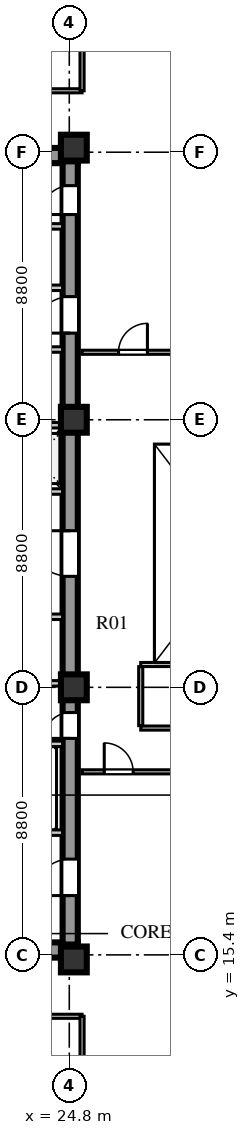
"""IFC4 building model, lengths in metres.
Left out: names, types, materials, properties, quantities, classifications, styles, units other than length and angle.
Written with IfcOpenShell. Run it as: python <this file> out.ifc"""

import sys

from ifc_helpers import new_model, si_unit, direction, frame, frame_2d, origin, origin_2d, place, context, subcontext, project, spatial, rectangle, extrude, element, fill, save


model = new_model("IFC4")
c1 = context("Model", 3, precision=1e-05, world=origin(), true_north=direction((0.0, 1.0)))
c2 = subcontext(c1, "Body", "Model", "MODEL_VIEW")
j1 = project(units=[si_unit("LENGTHUNIT", "METRE"), si_unit("PLANEANGLEUNIT", "RADIAN")], contexts=[c1])
p1 = place(None, origin())
s1 = spatial("IfcSite", under=j1, at=p1, CompositionType="ELEMENT")
p2 = place(p1, origin())
s2 = spatial("IfcBuilding", under=s1, at=p2, CompositionType="ELEMENT")
p3 = place(p2, frame((0.0, 0.0, 119.4)))
s3 = spatial("IfcBuildingStorey", under=s2, at=p3, CompositionType="ELEMENT", Elevation=119.4)
for number, where, z_axis, x_axis in (
    (1, (15.4, 15.56, 0.0), (0.0, 0.0, 1.0), (1.0, 0.0, 0.0)),
    (2, (15.4, 41.69, 0.0), (0.0, 0.0, 1.0), (1.0, 0.0, 0.0)),
):
    element("IfcWall", number, at=place(p3, frame(where, z_axis=z_axis, x_axis=x_axis)), inside=s3, PredefinedType="SHEAR", context=c2, shape_type="SweptSolid", body=[
        extrude(rectangle(XDim=9.68, YDim=0.5, at=frame_2d((4.84, 0.0))), origin(), (0.0, 0.0, 1.0), 3.6),
    ])
p4 = place(p3, frame((24.83, 15.74, 0.0), z_axis=(0.0, 0.0, 1.0), x_axis=(0.0, 1.0, 0.0)))
e3 = element("IfcWall", 3, at=p4, inside=s3, PredefinedType="SHEAR", context=c2, shape_type="SweptSolid", body=[
    extrude(rectangle(XDim=25.76, YDim=0.5, at=frame_2d((12.88, 0.0))), origin(), (0.0, 0.0, 1.0), 3.6),
])
p5 = place(p4, frame((1.61, 0.0, 0.0)))
e4 = element("IfcOpeningElement", 4, at=p5, cuts=e3, PredefinedType="OPENING", context=c2, shape_type="SweptSolid", body=[
    extrude(rectangle(XDim=1.2, YDim=2.1, at=frame_2d((0.6, 1.05))), frame((0.0, 0.26, 0.0), z_axis=(0.0, -1.0, 0.0), x_axis=(1.0, 0.0, 0.0)), (0.0, 0.0, 1.0), 0.52),
])
p6 = place(p4, frame((6.78, 0.0, 0.0)))
e5 = element("IfcOpeningElement", 5, at=p6, cuts=e3, PredefinedType="OPENING", context=c2, shape_type="SweptSolid", body=[
    extrude(rectangle(XDim=0.85, YDim=2.06, at=frame_2d((0.425, 1.03))), frame((0.0, 0.26, 0.0), z_axis=(0.0, -1.0, 0.0), x_axis=(1.0, 0.0, 0.0)), (0.0, 0.0, 1.0), 0.52),
])
p7 = place(p4, frame((12.11, 0.0, 0.0)))
e6 = element("IfcOpeningElement", 6, at=p7, cuts=e3, PredefinedType="OPENING", context=c2, shape_type="SweptSolid", body=[
    extrude(rectangle(XDim=1.5, YDim=2.12, at=frame_2d((0.75, 1.06))), frame((0.0, 0.26, 0.0), z_axis=(0.0, -1.0, 0.0), x_axis=(1.0, 0.0, 0.0)), (0.0, 0.0, 1.0), 0.52),
])
p8 = place(p4, frame((20.11, 0.0, 0.0)))
e7 = element("IfcOpeningElement", 7, at=p8, cuts=e3, PredefinedType="OPENING", context=c2, shape_type="SweptSolid", body=[
    extrude(rectangle(XDim=1.2, YDim=2.12, at=frame_2d((0.6, 1.06))), frame((0.0, 0.26, 0.0), z_axis=(0.0, -1.0, 0.0), x_axis=(1.0, 0.0, 0.0)), (0.0, 0.0, 1.0), 0.52),
])
p9 = place(p4, frame((24.01, 0.0, 0.0)))
e8 = element("IfcOpeningElement", 8, at=p9, cuts=e3, PredefinedType="OPENING", context=c2, shape_type="SweptSolid", body=[
    extrude(rectangle(XDim=0.95, YDim=2.1, at=frame_2d((0.475, 1.05))), frame((0.0, 0.26, 0.0), z_axis=(0.0, -1.0, 0.0), x_axis=(1.0, 0.0, 0.0)), (0.0, 0.0, 1.0), 0.52),
])
for number, where, z_axis, x_axis in (
    (9, (24.95, 15.25, 0.0), (0.0, 0.0, 1.0), (1.0, 0.0, 0.0)),
    (10, (24.95, 24.2, 0.0), (0.0, 0.0, 1.0), (1.0, 0.0, 0.0)),
    (11, (24.95, 33.0, 0.0), (0.0, 0.0, 1.0), (1.0, 0.0, 0.0)),
    (12, (24.95, 41.95, 0.0), (0.0, 0.0, 1.0), (1.0, 0.0, 0.0)),
):
    element("IfcColumn", number, at=place(p3, frame(where, z_axis=z_axis, x_axis=x_axis)), inside=s3, PredefinedType="COLUMN", context=c2, shape_type="SweptSolid", body=[
        extrude(rectangle(XDim=0.85, YDim=0.85, at=origin_2d()), origin(), (0.0, 0.0, 1.0), 3.6),
    ])
p10 = place(p3, frame((19.64, 19.42, 0.0), z_axis=(0.0, 0.0, 1.0), x_axis=(1.0, 0.0, 0.0)))
e13 = element("IfcWall", 13, at=p10, inside=s3, PredefinedType="SOLIDWALL", context=c2, shape_type="SweptSolid", body=[
    extrude(rectangle(XDim=4.94, YDim=0.18, at=frame_2d((2.47, 0.0))), origin(), (0.0, 0.0, 1.0), 3.6),
])
p11 = place(p10, frame((0.72, 0.0, 0.0)))
e14 = element("IfcOpeningElement", 14, at=p11, cuts=e13, PredefinedType="OPENING", context=c2, shape_type="SweptSolid", body=[
    extrude(rectangle(XDim=1.1, YDim=2.1, at=frame_2d((0.55, 1.05))), frame((0.0, 0.1, 0.0), z_axis=(0.0, -1.0, 0.0), x_axis=(1.0, 0.0, 0.0)), (0.0, 0.0, 1.0), 0.2),
])
p12 = place(p10, frame((3.02, 0.0, 0.0)))
e15 = element("IfcOpeningElement", 15, at=p12, cuts=e13, PredefinedType="OPENING", context=c2, shape_type="SweptSolid", body=[
    extrude(rectangle(XDim=1.1, YDim=2.1, at=frame_2d((0.55, 1.05))), frame((0.0, 0.1, 0.0), z_axis=(0.0, -1.0, 0.0), x_axis=(1.0, 0.0, 0.0)), (0.0, 0.0, 1.0), 0.2),
])
p13 = place(p3, frame((19.64, 22.34, 0.0), z_axis=(0.0, 0.0, 1.0), x_axis=(1.0, 0.0, 0.0)))
e16 = element("IfcWall", 16, at=p13, inside=s3, PredefinedType="SOLIDWALL", context=c2, shape_type="SweptSolid", body=[
    extrude(rectangle(XDim=4.94, YDim=0.18, at=frame_2d((2.47, 0.0))), origin(), (0.0, 0.0, 1.0), 3.6),
])
p14 = place(p3, frame((15.9, 26.52, 0.0), z_axis=(0.0, 0.0, 1.0), x_axis=(1.0, 0.0, 0.0)))
e17 = element("IfcWall", 17, at=p14, inside=s3, PredefinedType="SOLIDWALL", context=c2, shape_type="SweptSolid", body=[
    extrude(rectangle(XDim=8.68, YDim=0.18, at=frame_2d((4.34, 0.0))), origin(), (0.0, 0.0, 1.0), 3.6),
])
p15 = place(p14, frame((2.5, 0.0, 0.0)))
e18 = element("IfcOpeningElement", 18, at=p15, cuts=e17, PredefinedType="OPENING", context=c2, shape_type="SweptSolid", body=[
    extrude(rectangle(XDim=0.95, YDim=2.1, at=frame_2d((0.475, 1.05))), frame((0.0, 0.1, 0.0), z_axis=(0.0, -1.0, 0.0), x_axis=(1.0, 0.0, 0.0)), (0.0, 0.0, 1.0), 0.2),
])
p16 = place(p14, frame((6.0, 0.0, 0.0)))
e19 = element("IfcOpeningElement", 19, at=p16, cuts=e17, PredefinedType="OPENING", context=c2, shape_type="SweptSolid", body=[
    extrude(rectangle(XDim=0.95, YDim=2.1, at=frame_2d((0.475, 1.05))), frame((0.0, 0.1, 0.0), z_axis=(0.0, -1.0, 0.0), x_axis=(1.0, 0.0, 0.0)), (0.0, 0.0, 1.0), 0.2),
])
p17 = place(p3, frame((15.9, 24.33, 0.0), z_axis=(0.0, 0.0, 1.0), x_axis=(1.0, 0.0, 0.0)))
e20 = element("IfcWall", 20, at=p17, inside=s3, PredefinedType="SOLIDWALL", context=c2, shape_type="SweptSolid", body=[
    extrude(rectangle(XDim=8.68, YDim=0.18, at=frame_2d((4.34, 0.0))), origin(), (0.0, 0.0, 1.0), 2.95),
])
p18 = place(p3, frame((15.9, 30.64, 0.0), z_axis=(0.0, 0.0, 1.0), x_axis=(1.0, 0.0, 0.0)))
e21 = element("IfcWall", 21, at=p18, inside=s3, PredefinedType="SOLIDWALL", context=c2, shape_type="SweptSolid", body=[
    extrude(rectangle(XDim=8.68, YDim=0.18, at=frame_2d((4.34, 0.0))), origin(), (0.0, 0.0, 1.0), 3.6),
])
p19 = place(p18, frame((1.76, 0.0, 0.0)))
e22 = element("IfcOpeningElement", 22, at=p19, cuts=e21, PredefinedType="OPENING", context=c2, shape_type="SweptSolid", body=[
    extrude(rectangle(XDim=1.0, YDim=2.1, at=frame_2d((0.5, 1.05))), frame((0.0, 0.1, 0.0), z_axis=(0.0, -1.0, 0.0), x_axis=(1.0, 0.0, 0.0)), (0.0, 0.0, 1.0), 0.2),
])
p20 = place(p18, frame((3.6, 0.0, 0.0)))
e23 = element("IfcOpeningElement", 23, at=p20, cuts=e21, PredefinedType="OPENING", context=c2, shape_type="SweptSolid", body=[
    extrude(rectangle(XDim=1.0, YDim=2.1, at=frame_2d((0.5, 1.05))), frame((0.0, 0.1, 0.0), z_axis=(0.0, -1.0, 0.0), x_axis=(1.0, 0.0, 0.0)), (0.0, 0.0, 1.0), 0.2),
])
p21 = place(p18, frame((5.44, 0.0, 0.0)))
e24 = element("IfcOpeningElement", 24, at=p21, cuts=e21, PredefinedType="OPENING", context=c2, shape_type="SweptSolid", body=[
    extrude(rectangle(XDim=1.0, YDim=2.1, at=frame_2d((0.5, 1.05))), frame((0.0, 0.1, 0.0), z_axis=(0.0, -1.0, 0.0), x_axis=(1.0, 0.0, 0.0)), (0.0, 0.0, 1.0), 0.2),
])
p22 = place(p18, frame((7.28, 0.0, 0.0)))
e25 = element("IfcOpeningElement", 25, at=p22, cuts=e21, PredefinedType="OPENING", context=c2, shape_type="SweptSolid", body=[
    extrude(rectangle(XDim=1.0, YDim=2.1, at=frame_2d((0.5, 1.05))), frame((0.0, 0.1, 0.0), z_axis=(0.0, -1.0, 0.0), x_axis=(1.0, 0.0, 0.0)), (0.0, 0.0, 1.0), 0.2),
])
p23 = place(p3, frame((15.9, 32.82, 0.0), z_axis=(0.0, 0.0, 1.0), x_axis=(1.0, 0.0, 0.0)))
e26 = element("IfcWall", 26, at=p23, inside=s3, PredefinedType="SOLIDWALL", context=c2, shape_type="SweptSolid", body=[
    extrude(rectangle(XDim=8.68, YDim=0.18, at=frame_2d((4.34, 0.0))), origin(), (0.0, 0.0, 1.0), 2.95),
])
p24 = place(p3, frame((22.02, 35.31, 0.0), z_axis=(0.0, 0.0, 1.0), x_axis=(1.0, 0.0, 0.0)))
e27 = element("IfcWall", 27, at=p24, inside=s3, PredefinedType="SOLIDWALL", context=c2, shape_type="SweptSolid", body=[
    extrude(rectangle(XDim=2.56, YDim=0.18, at=frame_2d((1.28, 0.0))), origin(), (0.0, 0.0, 1.0), 3.6),
])
p25 = place(p24, frame((0.55, 0.0, 0.0)))
e28 = element("IfcOpeningElement", 28, at=p25, cuts=e27, PredefinedType="OPENING", context=c2, shape_type="SweptSolid", body=[
    extrude(rectangle(XDim=1.0, YDim=2.1, at=frame_2d((0.5, 1.05))), frame((0.0, 0.1, 0.0), z_axis=(0.0, -1.0, 0.0), x_axis=(1.0, 0.0, 0.0)), (0.0, 0.0, 1.0), 0.2),
])
p26 = place(p3, frame((19.64, 37.34, 0.0), z_axis=(0.0, 0.0, 1.0), x_axis=(1.0, 0.0, 0.0)))
e29 = element("IfcWall", 29, at=p26, inside=s3, PredefinedType="SOLIDWALL", context=c2, shape_type="SweptSolid", body=[
    extrude(rectangle(XDim=4.94, YDim=0.18, at=frame_2d((2.47, 0.0))), origin(), (0.0, 0.0, 1.0), 3.6),
])
p27 = place(p26, frame((0.45, 0.0, 0.0)))
e30 = element("IfcOpeningElement", 30, at=p27, cuts=e29, PredefinedType="OPENING", context=c2, shape_type="SweptSolid", body=[
    extrude(rectangle(XDim=1.0, YDim=2.1, at=frame_2d((0.5, 1.05))), frame((0.0, 0.1, 0.0), z_axis=(0.0, -1.0, 0.0), x_axis=(1.0, 0.0, 0.0)), (0.0, 0.0, 1.0), 0.2),
])
p28 = place(p26, frame((2.5, 0.0, 0.0)))
e31 = element("IfcOpeningElement", 31, at=p28, cuts=e29, PredefinedType="OPENING", context=c2, shape_type="SweptSolid", body=[
    extrude(rectangle(XDim=1.0, YDim=2.1, at=frame_2d((0.5, 1.05))), frame((0.0, 0.1, 0.0), z_axis=(0.0, -1.0, 0.0), x_axis=(1.0, 0.0, 0.0)), (0.0, 0.0, 1.0), 0.2),
])
p29 = place(p3, frame((19.64, 39.36, 0.0), z_axis=(0.0, 0.0, 1.0), x_axis=(1.0, 0.0, 0.0)))
e32 = element("IfcWall", 32, at=p29, inside=s3, PredefinedType="SOLIDWALL", context=c2, shape_type="SweptSolid", body=[
    extrude(rectangle(XDim=4.94, YDim=0.18, at=frame_2d((2.47, 0.0))), origin(), (0.0, 0.0, 1.0), 3.6),
])
p30 = place(p3, frame((25.22, 21.42, 0.0), z_axis=(0.0, 0.0, 1.0), x_axis=(1.0, 0.0, 0.0)))
e33 = element("IfcWall", 33, at=p30, inside=s3, PredefinedType="PARTITIONING", context=c2, shape_type="SweptSolid", body=[
    extrude(rectangle(XDim=15.6, YDim=0.135, at=frame_2d((7.8, 0.0))), origin(), (0.0, 0.0, 1.0), 3.2),
])
p31 = place(p30, frame((0.73, 0.0, 0.0)))
e34 = element("IfcOpeningElement", 34, at=p31, cuts=e33, PredefinedType="OPENING", context=c2, shape_type="SweptSolid", body=[
    extrude(rectangle(XDim=0.95, YDim=2.1, at=frame_2d((0.475, 1.05))), frame((0.0, 0.078, 0.0), z_axis=(0.0, -1.0, 0.0), x_axis=(1.0, 0.0, 0.0)), (0.0, 0.0, 1.0), 0.155),
])
p32 = place(p30, frame((8.43, 0.0, 0.0)))
e35 = element("IfcOpeningElement", 35, at=p32, cuts=e33, PredefinedType="OPENING", context=c2, shape_type="SweptSolid", body=[
    extrude(rectangle(XDim=0.95, YDim=2.1, at=frame_2d((0.475, 1.05))), frame((0.0, 0.078, 0.0), z_axis=(0.0, -1.0, 0.0), x_axis=(1.0, 0.0, 0.0)), (0.0, 0.0, 1.0), 0.155),
])
p33 = place(p3, frame((27.15, 22.86, 0.0), z_axis=(0.0, 0.0, 1.0), x_axis=(1.0, 0.0, 0.0)))
e36 = element("IfcWall", 36, at=p33, inside=s3, PredefinedType="PARTITIONING", context=c2, shape_type="SweptSolid", body=[
    extrude(rectangle(XDim=13.67, YDim=0.135, at=frame_2d((6.835, 0.0))), origin(), (0.0, 0.0, 1.0), 3.6),
])
p34 = place(p33, frame((2.2, 0.0, 0.0)))
e37 = element("IfcOpeningElement", 37, at=p34, cuts=e36, PredefinedType="OPENING", context=c2, shape_type="SweptSolid", body=[
    extrude(rectangle(XDim=0.9, YDim=2.08, at=frame_2d((0.45, 1.04))), frame((0.0, 0.078, 0.0), z_axis=(0.0, -1.0, 0.0), x_axis=(1.0, 0.0, 0.0)), (0.0, 0.0, 1.0), 0.155),
])
p35 = place(p3, frame((25.22, 35.22, 0.0), z_axis=(0.0, 0.0, 1.0), x_axis=(1.0, 0.0, 0.0)))
e38 = element("IfcWall", 38, at=p35, inside=s3, PredefinedType="PARTITIONING", context=c2, shape_type="SweptSolid", body=[
    extrude(rectangle(XDim=9.5, YDim=0.135, at=frame_2d((4.75, 0.0))), origin(), (0.0, 0.0, 1.0), 3.6),
])
p36 = place(p35, frame((1.2, 0.0, 0.0)))
e39 = element("IfcOpeningElement", 39, at=p36, cuts=e38, PredefinedType="OPENING", context=c2, shape_type="SweptSolid", body=[
    extrude(rectangle(XDim=0.95, YDim=2.1, at=frame_2d((0.475, 1.05))), frame((0.0, 0.078, 0.0), z_axis=(0.0, -1.0, 0.0), x_axis=(1.0, 0.0, 0.0)), (0.0, 0.0, 1.0), 0.155),
])
p37 = place(p3, frame((13.59, 13.38, 0.0), z_axis=(0.0, 0.0, 1.0), x_axis=(1.0, 0.0, 0.0)))
e40 = element("IfcWall", 40, at=p37, inside=s3, PredefinedType="PARTITIONING", context=c2, shape_type="SweptSolid", body=[
    extrude(rectangle(XDim=11.63, YDim=0.135, at=frame_2d((5.815, 0.0))), origin(), (0.0, 0.0, 1.0), 3.6),
])
p38 = place(p37, frame((4.56, 0.0, 0.0)))
e41 = element("IfcOpeningElement", 41, at=p38, cuts=e40, PredefinedType="OPENING", context=c2, shape_type="SweptSolid", body=[
    extrude(rectangle(XDim=1.0, YDim=2.08, at=frame_2d((0.5, 1.04))), frame((0.0, 0.078, 0.0), z_axis=(0.0, -1.0, 0.0), x_axis=(1.0, 0.0, 0.0)), (0.0, 0.0, 1.0), 0.155),
])
p39 = place(p3, frame((25.22, 10.28, 0.0), z_axis=(0.0, 0.0, 1.0), x_axis=(0.0, 1.0, 0.0)))
e42 = element("IfcWall", 42, at=p39, inside=s3, PredefinedType="PARTITIONING", context=c2, shape_type="SweptSolid", body=[
    extrude(rectangle(XDim=3.1, YDim=0.135, at=frame_2d((1.55, 0.0))), origin(), (0.0, 0.0, 1.0), 3.1),
])
p40 = place(p3, frame((13.59, 43.82, 0.0), z_axis=(0.0, 0.0, 1.0), x_axis=(1.0, 0.0, 0.0)))
e43 = element("IfcWall", 43, at=p40, inside=s3, PredefinedType="PARTITIONING", context=c2, shape_type="SweptSolid", body=[
    extrude(rectangle(XDim=11.63, YDim=0.135, at=frame_2d((5.815, 0.0))), origin(), (0.0, 0.0, 1.0), 3.6),
])
p41 = place(p40, frame((4.56, 0.0, 0.0)))
e44 = element("IfcOpeningElement", 44, at=p41, cuts=e43, PredefinedType="OPENING", context=c2, shape_type="SweptSolid", body=[
    extrude(rectangle(XDim=1.0, YDim=2.08, at=frame_2d((0.5, 1.04))), frame((0.0, 0.078, 0.0), z_axis=(0.0, -1.0, 0.0), x_axis=(1.0, 0.0, 0.0)), (0.0, 0.0, 1.0), 0.155),
])
p42 = place(p3, frame((25.22, 43.82, 0.0), z_axis=(0.0, 0.0, 1.0), x_axis=(0.0, 1.0, 0.0)))
e45 = element("IfcWall", 45, at=p42, inside=s3, PredefinedType="PARTITIONING", context=c2, shape_type="SweptSolid", body=[
    extrude(rectangle(XDim=3.1, YDim=0.135, at=frame_2d((1.55, 0.0))), origin(), (0.0, 0.0, 1.0), 3.1),
])
p43 = place(p3, frame((27.15, 24.95, 0.0), z_axis=(0.0, 0.0, 1.0), x_axis=(1.0, 0.0, 0.0)))
e46 = element("IfcWall", 46, at=p43, inside=s3, PredefinedType="PARTITIONING", context=c2, shape_type="SweptSolid", body=[
    extrude(rectangle(XDim=9.67, YDim=0.135, at=frame_2d((4.835, 0.0))), origin(), (0.0, 0.0, 1.0), 3.05),
])
p44 = place(p3, frame((27.15, 22.94, 0.0), z_axis=(0.0, 0.0, 1.0), x_axis=(0.0, 1.0, 0.0)))
e47 = element("IfcWall", 47, at=p44, inside=s3, PredefinedType="PARTITIONING", context=c2, shape_type="SweptSolid", body=[
    extrude(rectangle(XDim=1.94, YDim=0.135, at=frame_2d((0.97, 0.0))), origin(), (0.0, 0.0, 1.0), 3.6),
])
p45 = place(p5, frame((1.2, 0.0, 0.0), z_axis=(0.0, 0.0, 1.0), x_axis=(-1.0, 0.0, 0.0)))
e48 = element("IfcDoor", 48, at=p45, inside=s3, OperationType="SINGLE_SWING_RIGHT", PredefinedType="DOOR", context=c2, shape_type="SweptSolid", body=[
    extrude(rectangle(XDim=1.2, YDim=2.1, at=frame_2d((0.6, 1.05))), frame((0.0, 0.025, 0.0), z_axis=(0.0, -1.0, 0.0), x_axis=(1.0, 0.0, 0.0)), (0.0, 0.0, 1.0), 0.05),
])
fill(e4, e48)
p46 = place(p6, frame((0.85, 0.0, 0.0), z_axis=(0.0, 0.0, 1.0), x_axis=(-1.0, 0.0, 0.0)))
e49 = element("IfcDoor", 49, at=p46, inside=s3, OperationType="SINGLE_SWING_RIGHT", PredefinedType="DOOR", context=c2, shape_type="SweptSolid", body=[
    extrude(rectangle(XDim=0.85, YDim=2.06, at=frame_2d((0.425, 1.03))), frame((0.0, 0.025, 0.0), z_axis=(0.0, -1.0, 0.0), x_axis=(1.0, 0.0, 0.0)), (0.0, 0.0, 1.0), 0.05),
])
fill(e5, e49)
p47 = place(p7, frame((1.5, 0.0, 0.0), z_axis=(0.0, 0.0, 1.0), x_axis=(-1.0, 0.0, 0.0)))
e50 = element("IfcDoor", 50, at=p47, inside=s3, OperationType="SINGLE_SWING_LEFT", PredefinedType="DOOR", context=c2, shape_type="SweptSolid", body=[
    extrude(rectangle(XDim=1.5, YDim=2.12, at=frame_2d((0.75, 1.06))), frame((0.0, 0.025, 0.0), z_axis=(0.0, -1.0, 0.0), x_axis=(1.0, 0.0, 0.0)), (0.0, 0.0, 1.0), 0.05),
])
fill(e6, e50)
p48 = place(p8, frame((1.2, 0.0, 0.0), z_axis=(0.0, 0.0, 1.0), x_axis=(-1.0, 0.0, 0.0)))
e51 = element("IfcDoor", 51, at=p48, inside=s3, OperationType="SINGLE_SWING_RIGHT", PredefinedType="DOOR", context=c2, shape_type="SweptSolid", body=[
    extrude(rectangle(XDim=1.2, YDim=2.12, at=frame_2d((0.6, 1.06))), frame((0.0, 0.025, 0.0), z_axis=(0.0, -1.0, 0.0), x_axis=(1.0, 0.0, 0.0)), (0.0, 0.0, 1.0), 0.05),
])
fill(e7, e51)
p49 = place(p9, frame((0.95, 0.0, 0.0), z_axis=(0.0, 0.0, 1.0), x_axis=(-1.0, 0.0, 0.0)))
e52 = element("IfcDoor", 52, at=p49, inside=s3, OperationType="SINGLE_SWING_RIGHT", PredefinedType="DOOR", context=c2, shape_type="SweptSolid", body=[
    extrude(rectangle(XDim=0.95, YDim=2.1, at=frame_2d((0.475, 1.05))), frame((0.0, 0.025, 0.0), z_axis=(0.0, -1.0, 0.0), x_axis=(1.0, 0.0, 0.0)), (0.0, 0.0, 1.0), 0.05),
])
fill(e8, e52)
p50 = place(p31, frame((0.95, 0.0, 0.0), z_axis=(0.0, 0.0, 1.0), x_axis=(-1.0, 0.0, 0.0)))
e53 = element("IfcDoor", 53, at=p50, inside=s3, OperationType="SINGLE_SWING_RIGHT", PredefinedType="DOOR", context=c2, shape_type="SweptSolid", body=[
    extrude(rectangle(XDim=0.95, YDim=2.1, at=frame_2d((0.475, 1.05))), frame((0.0, 0.025, 0.0), z_axis=(0.0, -1.0, 0.0), x_axis=(1.0, 0.0, 0.0)), (0.0, 0.0, 1.0), 0.05),
])
fill(e34, e53)
p51 = place(p36, origin())
e54 = element("IfcDoor", 54, at=p51, inside=s3, OperationType="SINGLE_SWING_RIGHT", PredefinedType="DOOR", context=c2, shape_type="SweptSolid", body=[
    extrude(rectangle(XDim=0.95, YDim=2.1, at=frame_2d((0.475, 1.05))), frame((0.0, 0.025, 0.0), z_axis=(0.0, -1.0, 0.0), x_axis=(1.0, 0.0, 0.0)), (0.0, 0.0, 1.0), 0.05),
])
fill(e39, e54)
save(model, sys.argv[1])
